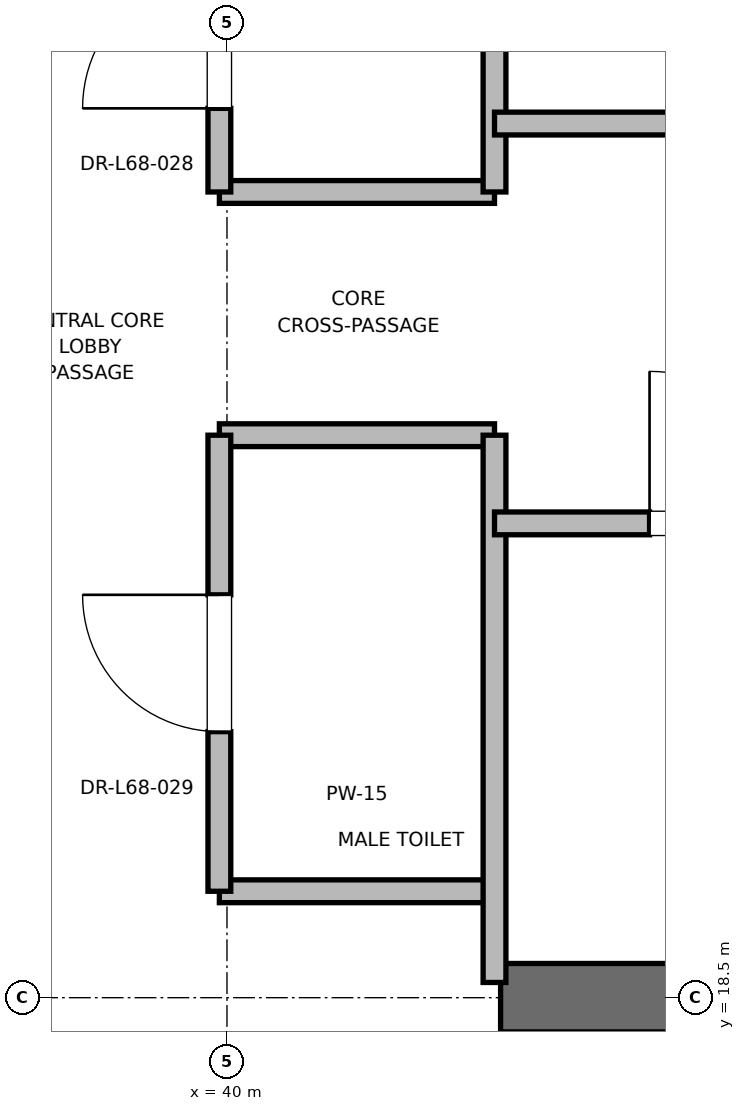
"""IFC4 building model, lengths in metres.
Left out: names, types, materials, properties, quantities, classifications, styles, units other than length and angle.
Written with IfcOpenShell. Run it as: python <this file> out.ifc"""

import sys

from ifc_helpers import new_model, si_unit, direction, frame, frame_2d, origin, place, context, subcontext, project, spatial, rectangle, extrude, element, fill, save


model = new_model("IFC4")
c1 = context("Model", 3, precision=1e-05, world=origin(), true_north=direction((0.0, 1.0)))
c2 = subcontext(c1, "Body", "Model", "MODEL_VIEW")
j1 = project(units=[si_unit("LENGTHUNIT", "METRE"), si_unit("PLANEANGLEUNIT", "RADIAN")], contexts=[c1])
p1 = place(None, origin())
s1 = spatial("IfcSite", under=j1, at=p1, CompositionType="ELEMENT")
p2 = place(p1, origin())
s2 = spatial("IfcBuilding", under=s1, at=p2, CompositionType="ELEMENT")
p3 = place(p2, frame((0.0, 0.0, 291.2)))
s3 = spatial("IfcBuildingStorey", under=s2, at=p3, CompositionType="ELEMENT", Elevation=291.2)
p4 = place(p3, frame((41.8, 18.5, 0.0), z_axis=(0.0, 0.0, 1.0), x_axis=(1.0, 0.0, 0.0)))
e1 = element("IfcWall", 1, at=p4, inside=s3, PredefinedType="SHEAR", context=c2, shape_type="SweptSolid", body=[
    extrude(rectangle(XDim=9.2, YDim=0.45, at=frame_2d((4.6, 0.0))), origin(), (0.0, 0.0, 1.0), 3.7),
])
for number, where, z_axis, x_axis in (
    (2, (39.95, 19.2, 0.0), (0.0, 0.0, 1.0), (1.0, 0.0, 0.0)),
    (3, (39.95, 22.2, 0.0), (0.0, 0.0, 1.0), (1.0, 0.0, 0.0)),
    (4, (39.95, 23.8, 0.0), (0.0, 0.0, 1.0), (1.0, 0.0, 0.0)),
):
    element("IfcWall", number, at=place(p3, frame(where, z_axis=z_axis, x_axis=x_axis)), inside=s3, PredefinedType="PARTITIONING", context=c2, shape_type="SweptSolid", body=[
        extrude(rectangle(XDim=1.81, YDim=0.15, at=frame_2d((0.905, 0.0))), origin(), (0.0, 0.0, 1.0), 2.85),
    ])
p5 = place(p3, frame((41.76, 18.6, 0.0), z_axis=(0.0, 0.0, 1.0), x_axis=(0.0, 1.0, 0.0)))
e5 = element("IfcWall", 5, at=p5, inside=s3, PredefinedType="PARTITIONING", context=c2, shape_type="SweptSolid", body=[
    extrude(rectangle(XDim=3.6, YDim=0.15, at=frame_2d((1.8, 0.0))), origin(), (0.0, 0.0, 1.0), 2.78),
])
p6 = place(p3, frame((41.76, 23.8, 0.0), z_axis=(0.0, 0.0, 1.0), x_axis=(0.0, 1.0, 0.0)))
e6 = element("IfcWall", 6, at=p6, inside=s3, PredefinedType="PARTITIONING", context=c2, shape_type="SweptSolid", body=[
    extrude(rectangle(XDim=4.0, YDim=0.15, at=frame_2d((2.0, 0.0))), origin(), (0.0, 0.0, 1.0), 2.85),
])
p7 = place(p3, frame((39.95, 19.2, 0.0), z_axis=(0.0, 0.0, 1.0), x_axis=(0.0, 1.0, 0.0)))
e7 = element("IfcWall", 7, at=p7, inside=s3, PredefinedType="PARTITIONING", context=c2, shape_type="SweptSolid", body=[
    extrude(rectangle(XDim=3.0, YDim=0.15, at=frame_2d((1.5, 0.0))), origin(), (0.0, 0.0, 1.0), 2.85),
])
p8 = place(p7, frame((1.05, 0.0, 0.0)))
e8 = element("IfcOpeningElement", 8, at=p8, cuts=e7, PredefinedType="OPENING", context=c2, shape_type="SweptSolid", body=[
    extrude(rectangle(XDim=0.9, YDim=2.1, at=frame_2d((0.45, 1.05))), frame((0.0, 0.075, 0.0), z_axis=(0.0, -1.0, 0.0), x_axis=(1.0, 0.0, 0.0)), (0.0, 0.0, 1.0), 0.15),
])
p9 = place(p3, frame((39.95, 23.8, 0.0), z_axis=(0.0, 0.0, 1.0), x_axis=(0.0, 1.0, 0.0)))
e9 = element("IfcWall", 9, at=p9, inside=s3, PredefinedType="PARTITIONING", context=c2, shape_type="SweptSolid", body=[
    extrude(rectangle(XDim=2.0, YDim=0.15, at=frame_2d((1.0, 0.0))), origin(), (0.0, 0.0, 1.0), 2.85),
])
p10 = place(p9, frame((0.55, 0.0, 0.0)))
e10 = element("IfcOpeningElement", 10, at=p10, cuts=e9, PredefinedType="OPENING", context=c2, shape_type="SweptSolid", body=[
    extrude(rectangle(XDim=0.9, YDim=2.1, at=frame_2d((0.45, 1.05))), frame((0.0, 0.075, 0.0), z_axis=(0.0, -1.0, 0.0), x_axis=(1.0, 0.0, 0.0)), (0.0, 0.0, 1.0), 0.15),
])
p11 = place(p3, frame((41.76, 21.62, 0.0), z_axis=(0.0, 0.0, 1.0), x_axis=(1.0, 0.0, 0.0)))
e11 = element("IfcWall", 11, at=p11, inside=s3, PredefinedType="PARTITIONING", context=c2, shape_type="SweptSolid", body=[
    extrude(rectangle(XDim=3.04, YDim=0.15, at=frame_2d((1.52, 0.0))), origin(), (0.0, 0.0, 1.0), 2.85),
])
p12 = place(p11, frame((1.02, 0.0, 0.0)))
e12 = element("IfcOpeningElement", 12, at=p12, cuts=e11, PredefinedType="OPENING", context=c2, shape_type="SweptSolid", body=[
    extrude(rectangle(XDim=1.0, YDim=2.15, at=frame_2d((0.5, 1.075))), frame((0.0, 0.075, 0.0), z_axis=(0.0, -1.0, 0.0), x_axis=(1.0, 0.0, 0.0)), (0.0, 0.0, 1.0), 0.15),
])
p13 = place(p3, frame((41.76, 24.25, 0.0), z_axis=(0.0, 0.0, 1.0), x_axis=(1.0, 0.0, 0.0)))
e13 = element("IfcWall", 13, at=p13, inside=s3, PredefinedType="PARTITIONING", context=c2, shape_type="SweptSolid", body=[
    extrude(rectangle(XDim=3.39, YDim=0.15, at=frame_2d((1.695, 0.0))), origin(), (0.0, 0.0, 1.0), 2.85),
])
p14 = place(p13, frame((1.255, 0.0, 0.0)))
e14 = element("IfcOpeningElement", 14, at=p14, cuts=e13, PredefinedType="OPENING", context=c2, shape_type="SweptSolid", body=[
    extrude(rectangle(XDim=0.88, YDim=2.1, at=frame_2d((0.44, 1.05))), frame((0.0, 0.075, 0.0), z_axis=(0.0, -1.0, 0.0), x_axis=(1.0, 0.0, 0.0)), (0.0, 0.0, 1.0), 0.15),
])
p15 = place(p8, origin())
e15 = element("IfcDoor", 15, at=p15, inside=s3, OperationType="SINGLE_SWING_RIGHT", PredefinedType="DOOR", context=c2, shape_type="SweptSolid", body=[
    extrude(rectangle(XDim=0.9, YDim=2.1, at=frame_2d((0.45, 1.05))), frame((0.0, 0.025, 0.0), z_axis=(0.0, -1.0, 0.0), x_axis=(1.0, 0.0, 0.0)), (0.0, 0.0, 1.0), 0.05),
])
fill(e8, e15)
p16 = place(p10, origin())
e16 = element("IfcDoor", 16, at=p16, inside=s3, OperationType="SINGLE_SWING_LEFT", PredefinedType="DOOR", context=c2, shape_type="SweptSolid", body=[
    extrude(rectangle(XDim=0.9, YDim=2.1, at=frame_2d((0.45, 1.05))), frame((0.0, 0.025, 0.0), z_axis=(0.0, -1.0, 0.0), x_axis=(1.0, 0.0, 0.0)), (0.0, 0.0, 1.0), 0.05),
])
fill(e10, e16)
p17 = place(p12, origin())
e17 = element("IfcDoor", 17, at=p17, inside=s3, OperationType="SINGLE_SWING_LEFT", PredefinedType="DOOR", context=c2, shape_type="SweptSolid", body=[
    extrude(rectangle(XDim=1.0, YDim=2.15, at=frame_2d((0.5, 1.075))), frame((0.0, 0.025, 0.0), z_axis=(0.0, -1.0, 0.0), x_axis=(1.0, 0.0, 0.0)), (0.0, 0.0, 1.0), 0.05),
])
fill(e12, e17)
save(model, sys.argv[1])
